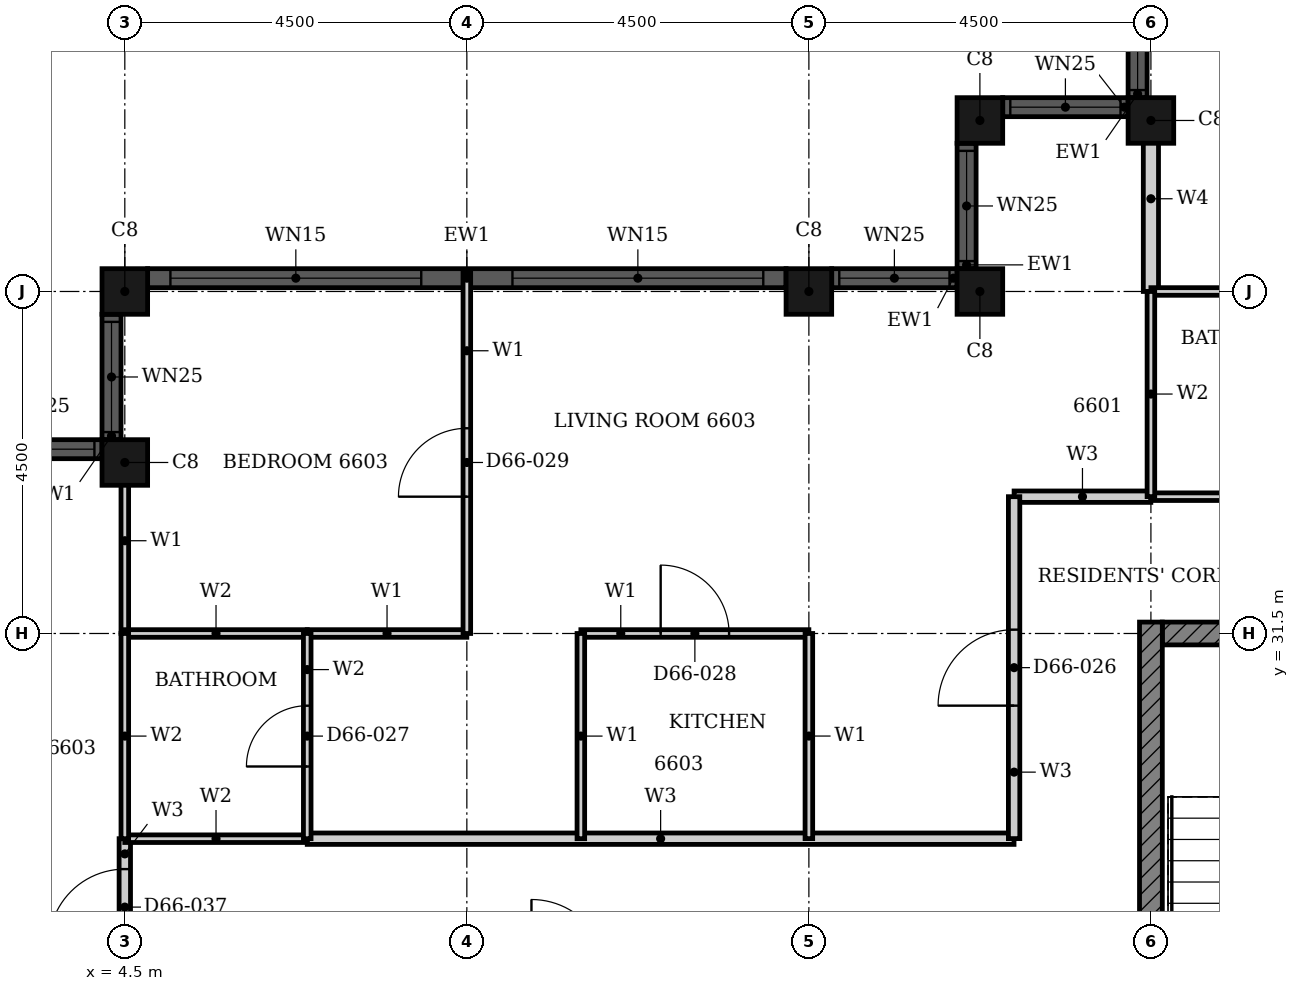
"""IFC4 building model, lengths in metres.
Left out: names, types, materials, properties, quantities, classifications, styles, units other than length and angle.
Written with IfcOpenShell. Run it as: python <this file> out.ifc"""

import sys

from ifc_helpers import new_model, si_unit, direction, frame, frame_2d, origin, origin_2d, place, context, subcontext, project, spatial, rectangle, hollow_rectangle, extrude, element, fill, save


model = new_model("IFC4")
c1 = context("Model", 3, precision=1e-05, world=origin(), true_north=direction((0.0, 1.0)))
c2 = subcontext(c1, "Body", "Model", "MODEL_VIEW")
j1 = project(units=[si_unit("LENGTHUNIT", "METRE"), si_unit("PLANEANGLEUNIT", "RADIAN")], contexts=[c1])
p1 = place(None, origin())
s1 = spatial("IfcSite", under=j1, at=p1, CompositionType="ELEMENT")
p2 = place(p1, origin())
s2 = spatial("IfcBuilding", under=s1, at=p2, CompositionType="ELEMENT")
p3 = place(p2, frame((0.0, 0.0, 260.1)))
s3 = spatial("IfcBuildingStorey", under=s2, at=p3, CompositionType="ELEMENT", Elevation=260.1)
for number, where, z_axis, x_axis in (
    (1, (18.0, 38.25, 0.0), (0.0, 0.0, 1.0), (1.0, 0.0, 0.0)),
    (2, (15.75, 38.25, 0.0), (0.0, 0.0, 1.0), (1.0, 0.0, 0.0)),
    (3, (15.75, 36.0, 0.0), (0.0, 0.0, 1.0), (1.0, 0.0, 0.0)),
    (4, (13.5, 36.0, 0.0), (0.0, 0.0, 1.0), (1.0, 0.0, 0.0)),
    (5, (4.5, 36.0, 0.0), (0.0, 0.0, 1.0), (1.0, 0.0, 0.0)),
    (6, (4.5, 33.75, 0.0), (0.0, 0.0, 1.0), (1.0, 0.0, 0.0)),
):
    element("IfcColumn", number, at=place(p3, frame(where, z_axis=z_axis, x_axis=x_axis)), inside=s3, PredefinedType="COLUMN", context=c2, shape_type="SweptSolid", body=[
        extrude(hollow_rectangle(XDim=0.6, YDim=0.6, WallThickness=0.02, at=origin_2d()), origin(), (0.0, 0.0, 1.0), 3.7),
    ])
p4 = place(p3, frame((17.825, 40.2, 0.0), z_axis=(0.0, 0.0, 1.0), x_axis=(0.0, -1.0, 0.0)))
e7 = element("IfcWall", 7, at=p4, inside=s3, PredefinedType="SOLIDWALL", context=c2, shape_type="SweptSolid", body=[
    extrude(rectangle(XDim=1.65, YDim=0.25, at=frame_2d((0.825, 0.0))), origin(), (0.0, 0.0, 1.0), 3.7),
])
p5 = place(p4, frame((0.1, 0.0, 0.9)))
e8 = element("IfcOpeningElement", 8, at=p5, cuts=e7, PredefinedType="OPENING", context=c2, shape_type="SweptSolid", body=[
    extrude(rectangle(XDim=1.45, YDim=1.85, at=frame_2d((0.725, 0.925))), frame((0.0, 0.135, 0.0), z_axis=(0.0, -1.0, 0.0), x_axis=(1.0, 0.0, 0.0)), (0.0, 0.0, 1.0), 0.27),
])
p6 = place(p3, frame((17.7, 38.425, 0.0), z_axis=(0.0, 0.0, 1.0), x_axis=(-1.0, 0.0, 0.0)))
e9 = element("IfcWall", 9, at=p6, inside=s3, PredefinedType="SOLIDWALL", context=c2, shape_type="SweptSolid", body=[
    extrude(rectangle(XDim=1.65, YDim=0.25, at=frame_2d((0.825, 0.0))), origin(), (0.0, 0.0, 1.0), 3.7),
])
p7 = place(p6, frame((0.1, 0.0, 0.9)))
e10 = element("IfcOpeningElement", 10, at=p7, cuts=e9, PredefinedType="OPENING", context=c2, shape_type="SweptSolid", body=[
    extrude(rectangle(XDim=1.45, YDim=1.85, at=frame_2d((0.725, 0.925))), frame((0.0, 0.135, 0.0), z_axis=(0.0, -1.0, 0.0), x_axis=(1.0, 0.0, 0.0)), (0.0, 0.0, 1.0), 0.27),
])
p8 = place(p3, frame((15.575, 37.95, 0.0), z_axis=(0.0, 0.0, 1.0), x_axis=(0.0, -1.0, 0.0)))
e11 = element("IfcWall", 11, at=p8, inside=s3, PredefinedType="SOLIDWALL", context=c2, shape_type="SweptSolid", body=[
    extrude(rectangle(XDim=1.65, YDim=0.25, at=frame_2d((0.825, 0.0))), origin(), (0.0, 0.0, 1.0), 3.7),
])
p9 = place(p8, frame((0.1, 0.0, 0.9)))
e12 = element("IfcOpeningElement", 12, at=p9, cuts=e11, PredefinedType="OPENING", context=c2, shape_type="SweptSolid", body=[
    extrude(rectangle(XDim=1.45, YDim=1.85, at=frame_2d((0.725, 0.925))), frame((0.0, 0.135, 0.0), z_axis=(0.0, -1.0, 0.0), x_axis=(1.0, 0.0, 0.0)), (0.0, 0.0, 1.0), 0.27),
])
p10 = place(p3, frame((15.45, 36.175, 0.0), z_axis=(0.0, 0.0, 1.0), x_axis=(-1.0, 0.0, 0.0)))
e13 = element("IfcWall", 13, at=p10, inside=s3, PredefinedType="SOLIDWALL", context=c2, shape_type="SweptSolid", body=[
    extrude(rectangle(XDim=1.65, YDim=0.25, at=frame_2d((0.825, 0.0))), origin(), (0.0, 0.0, 1.0), 3.7),
])
p11 = place(p10, frame((0.1, 0.0, 0.9)))
e14 = element("IfcOpeningElement", 14, at=p11, cuts=e13, PredefinedType="OPENING", context=c2, shape_type="SweptSolid", body=[
    extrude(rectangle(XDim=1.45, YDim=1.85, at=frame_2d((0.725, 0.925))), frame((0.0, 0.135, 0.0), z_axis=(0.0, -1.0, 0.0), x_axis=(1.0, 0.0, 0.0)), (0.0, 0.0, 1.0), 0.27),
])
p12 = place(p3, frame((13.2, 36.175, 0.0), z_axis=(0.0, 0.0, 1.0), x_axis=(-1.0, 0.0, 0.0)))
e15 = element("IfcWall", 15, at=p12, inside=s3, PredefinedType="SOLIDWALL", context=c2, shape_type="SweptSolid", body=[
    extrude(rectangle(XDim=8.4, YDim=0.25, at=frame_2d((4.2, 0.0))), origin(), (0.0, 0.0, 1.0), 3.7),
])
p13 = place(p12, frame((0.3, 0.0, 0.45)))
e16 = element("IfcOpeningElement", 16, at=p13, cuts=e15, PredefinedType="OPENING", context=c2, shape_type="SweptSolid", body=[
    extrude(rectangle(XDim=3.3, YDim=2.3, at=frame_2d((1.65, 1.15))), frame((0.0, 0.135, 0.0), z_axis=(0.0, -1.0, 0.0), x_axis=(1.0, 0.0, 0.0)), (0.0, 0.0, 1.0), 0.27),
])
p14 = place(p12, frame((4.8, 0.0, 0.45)))
e17 = element("IfcOpeningElement", 17, at=p14, cuts=e15, PredefinedType="OPENING", context=c2, shape_type="SweptSolid", body=[
    extrude(rectangle(XDim=3.3, YDim=2.3, at=frame_2d((1.65, 1.15))), frame((0.0, 0.135, 0.0), z_axis=(0.0, -1.0, 0.0), x_axis=(1.0, 0.0, 0.0)), (0.0, 0.0, 1.0), 0.27),
])
p15 = place(p3, frame((4.325, 35.7, 0.0), z_axis=(0.0, 0.0, 1.0), x_axis=(0.0, -1.0, 0.0)))
e18 = element("IfcWall", 18, at=p15, inside=s3, PredefinedType="SOLIDWALL", context=c2, shape_type="SweptSolid", body=[
    extrude(rectangle(XDim=1.65, YDim=0.25, at=frame_2d((0.825, 0.0))), origin(), (0.0, 0.0, 1.0), 3.7),
])
p16 = place(p15, frame((0.1, 0.0, 0.9)))
e19 = element("IfcOpeningElement", 19, at=p16, cuts=e18, PredefinedType="OPENING", context=c2, shape_type="SweptSolid", body=[
    extrude(rectangle(XDim=1.45, YDim=1.85, at=frame_2d((0.725, 0.925))), frame((0.0, 0.135, 0.0), z_axis=(0.0, -1.0, 0.0), x_axis=(1.0, 0.0, 0.0)), (0.0, 0.0, 1.0), 0.27),
])
p17 = place(p3, frame((4.2, 33.925, 0.0), z_axis=(0.0, 0.0, 1.0), x_axis=(-1.0, 0.0, 0.0)))
e20 = element("IfcWall", 20, at=p17, inside=s3, PredefinedType="SOLIDWALL", context=c2, shape_type="SweptSolid", body=[
    extrude(rectangle(XDim=1.65, YDim=0.25, at=frame_2d((0.825, 0.0))), origin(), (0.0, 0.0, 1.0), 3.7),
])
p18 = place(p17, frame((0.1, 0.0, 0.9)))
e21 = element("IfcOpeningElement", 21, at=p18, cuts=e20, PredefinedType="OPENING", context=c2, shape_type="SweptSolid", body=[
    extrude(rectangle(XDim=1.45, YDim=1.85, at=frame_2d((0.725, 0.925))), frame((0.0, 0.135, 0.0), z_axis=(0.0, -1.0, 0.0), x_axis=(1.0, 0.0, 0.0)), (0.0, 0.0, 1.0), 0.27),
])
p19 = place(p3, frame((18.15, 31.5, 0.0), z_axis=(0.0, 0.0, 1.0), x_axis=(1.0, 0.0, 0.0)))
e22 = element("IfcWall", 22, at=p19, inside=s3, PredefinedType="SHEAR", context=c2, shape_type="SweptSolid", body=[
    extrude(rectangle(XDim=9.368, YDim=0.3, at=frame_2d((4.684, 0.0))), origin(), (0.0, 0.0, 1.0), 3.4),
])
p20 = place(p19, frame((4.736, 0.0, 0.0)))
e23 = element("IfcOpeningElement", 23, at=p20, cuts=e22, PredefinedType="OPENING", context=c2, shape_type="SweptSolid", body=[
    extrude(rectangle(XDim=1.8, YDim=2.1, at=frame_2d((0.9, 1.05))), frame((0.0, 0.16, 0.0), z_axis=(0.0, -1.0, 0.0), x_axis=(1.0, 0.0, 0.0)), (0.0, 0.0, 1.0), 0.32),
])
p21 = place(p3, frame((18.0, 22.35, 0.0), z_axis=(0.0, 0.0, 1.0), x_axis=(0.0, 1.0, 0.0)))
e24 = element("IfcWall", 24, at=p21, inside=s3, PredefinedType="SHEAR", context=c2, shape_type="SweptSolid", body=[
    extrude(rectangle(XDim=9.3, YDim=0.3, at=frame_2d((4.65, 0.0))), origin(), (0.0, 0.0, 1.0), 3.4),
])
p22 = place(p3, frame((6.9, 28.8, 0.0), z_axis=(0.0, 0.0, 1.0), x_axis=(1.0, 0.0, 0.0)))
e25 = element("IfcWall", 25, at=p22, inside=s3, PredefinedType="PARTITIONING", context=c2, shape_type="SweptSolid", body=[
    extrude(rectangle(XDim=9.299, YDim=0.15, at=frame_2d((4.649, 0.0))), origin(), (0.0, 0.0, 1.0), 3.4),
])
p23 = place(p3, frame((16.2, 33.3, 0.0), z_axis=(0.0, 0.0, 1.0), x_axis=(1.0, 0.0, 0.0)))
e26 = element("IfcWall", 26, at=p23, inside=s3, PredefinedType="PARTITIONING", context=c2, shape_type="SweptSolid", body=[
    extrude(rectangle(XDim=1.799, YDim=0.15, at=frame_2d((0.899, 0.0))), origin(), (0.0, 0.0, 1.0), 3.4),
])
p24 = place(p3, frame((16.2, 28.801, 0.0), z_axis=(0.0, 0.0, 1.0), x_axis=(0.0, 1.0, 0.0)))
e27 = element("IfcWall", 27, at=p24, inside=s3, PredefinedType="PARTITIONING", context=c2, shape_type="SweptSolid", body=[
    extrude(rectangle(XDim=4.499, YDim=0.15, at=frame_2d((2.25, 0.0))), origin(), (0.0, 0.0, 1.0), 3.4),
])
p25 = place(p24, frame((1.75, 0.0, 0.0)))
e28 = element("IfcOpeningElement", 28, at=p25, cuts=e27, PredefinedType="OPENING", context=c2, shape_type="SweptSolid", body=[
    extrude(rectangle(XDim=1.0, YDim=2.2, at=frame_2d((0.5, 1.1))), frame((0.0, 0.085, 0.0), z_axis=(0.0, -1.0, 0.0), x_axis=(1.0, 0.0, 0.0)), (0.0, 0.0, 1.0), 0.17),
])
p26 = place(p3, frame((4.5, 27.0, 0.0), z_axis=(0.0, 0.0, 1.0), x_axis=(0.0, 1.0, 0.0)))
e29 = element("IfcWall", 29, at=p26, inside=s3, PredefinedType="PARTITIONING", context=c2, shape_type="SweptSolid", body=[
    extrude(rectangle(XDim=1.8, YDim=0.15, at=frame_2d((0.9, 0.0))), origin(), (0.0, 0.0, 1.0), 3.4),
])
p27 = place(p26, frame((0.4, 0.0, 0.0)))
e30 = element("IfcOpeningElement", 30, at=p27, cuts=e29, PredefinedType="OPENING", context=c2, shape_type="SweptSolid", body=[
    extrude(rectangle(XDim=1.0, YDim=2.1, at=frame_2d((0.5, 1.05))), frame((0.0, 0.085, 0.0), z_axis=(0.0, -1.0, 0.0), x_axis=(1.0, 0.0, 0.0)), (0.0, 0.0, 1.0), 0.17),
])
p28 = place(p3, frame((6.9, 31.5, 0.0), z_axis=(0.0, 0.0, 1.0), x_axis=(1.0, 0.0, 0.0)))
e31 = element("IfcWall", 31, at=p28, inside=s3, PredefinedType="PARTITIONING", context=c2, shape_type="SweptSolid", body=[
    extrude(rectangle(XDim=2.1, YDim=0.1, at=frame_2d((1.05, 0.0))), origin(), (0.0, 0.0, 1.0), 2.68),
])
p29 = place(p3, frame((10.5, 31.5, 0.0), z_axis=(0.0, 0.0, 1.0), x_axis=(1.0, 0.0, 0.0)))
e32 = element("IfcWall", 32, at=p29, inside=s3, PredefinedType="PARTITIONING", context=c2, shape_type="SweptSolid", body=[
    extrude(rectangle(XDim=3.0, YDim=0.1, at=frame_2d((1.5, 0.0))), origin(), (0.0, 0.0, 1.0), 2.68),
])
p30 = place(p29, frame((1.05, 0.0, 0.0)))
e33 = element("IfcOpeningElement", 33, at=p30, cuts=e32, PredefinedType="OPENING", context=c2, shape_type="SweptSolid", body=[
    extrude(rectangle(XDim=0.9, YDim=2.1, at=frame_2d((0.45, 1.05))), frame((0.0, 0.06, 0.0), z_axis=(0.0, -1.0, 0.0), x_axis=(1.0, 0.0, 0.0)), (0.0, 0.0, 1.0), 0.12),
])
p31 = place(p3, frame((10.5, 28.8, 0.0), z_axis=(0.0, 0.0, 1.0), x_axis=(0.0, 1.0, 0.0)))
e34 = element("IfcWall", 34, at=p31, inside=s3, PredefinedType="PARTITIONING", context=c2, shape_type="SweptSolid", body=[
    extrude(rectangle(XDim=2.7, YDim=0.1, at=frame_2d((1.35, 0.0))), origin(), (0.0, 0.0, 1.0), 3.4),
])
p32 = place(p3, frame((13.5, 28.801, 0.0), z_axis=(0.0, 0.0, 1.0), x_axis=(0.0, 1.0, 0.0)))
e35 = element("IfcWall", 35, at=p32, inside=s3, PredefinedType="PARTITIONING", context=c2, shape_type="SweptSolid", body=[
    extrude(rectangle(XDim=2.699, YDim=0.1, at=frame_2d((1.35, 0.0))), origin(), (0.0, 0.0, 1.0), 2.48),
])
p33 = place(p3, frame((4.5, 31.501, 0.0), z_axis=(0.0, 0.0, 1.0), x_axis=(0.0, 1.0, 0.0)))
e36 = element("IfcWall", 36, at=p33, inside=s3, PredefinedType="PARTITIONING", context=c2, shape_type="SweptSolid", body=[
    extrude(rectangle(XDim=2.439, YDim=0.1, at=frame_2d((1.219, 0.0))), origin(), (0.0, 0.0, 1.0), 3.4),
])
p34 = place(p3, frame((9.0, 31.5, 0.0), z_axis=(0.0, 0.0, 1.0), x_axis=(0.0, 1.0, 0.0)))
e37 = element("IfcWall", 37, at=p34, inside=s3, PredefinedType="PARTITIONING", context=c2, shape_type="SweptSolid", body=[
    extrude(rectangle(XDim=4.74, YDim=0.1, at=frame_2d((2.37, 0.0))), origin(), (0.0, 0.0, 1.0), 3.4),
])
p35 = place(p34, frame((1.8, 0.0, 0.0)))
e38 = element("IfcOpeningElement", 38, at=p35, cuts=e37, PredefinedType="OPENING", context=c2, shape_type="SweptSolid", body=[
    extrude(rectangle(XDim=0.9, YDim=2.1, at=frame_2d((0.45, 1.05))), frame((0.0, 0.06, 0.0), z_axis=(0.0, -1.0, 0.0), x_axis=(1.0, 0.0, 0.0)), (0.0, 0.0, 1.0), 0.12),
])
p36 = place(p3, frame((18.0, 36.0, 0.0), z_axis=(0.0, 0.0, 1.0), x_axis=(0.0, 1.0, 0.0)))
e39 = element("IfcWall", 39, at=p36, inside=s3, PredefinedType="PARTITIONING", context=c2, shape_type="SweptSolid", body=[
    extrude(rectangle(XDim=2.44, YDim=0.2, at=frame_2d((1.22, 0.0))), origin(), (0.0, 0.0, 1.0), 3.4),
])
p37 = place(p3, frame((4.5, 28.8, 0.0), z_axis=(0.0, 0.0, 1.0), x_axis=(1.0, 0.0, 0.0)))
e40 = element("IfcWall", 40, at=p37, inside=s3, PredefinedType="PARTITIONING", context=c2, shape_type="SweptSolid", body=[
    extrude(rectangle(XDim=2.4, YDim=0.1, at=frame_2d((1.2, 0.0))), origin(), (0.0, 0.0, 1.0), 3.4),
])
p38 = place(p3, frame((4.5, 31.5, 0.0), z_axis=(0.0, 0.0, 1.0), x_axis=(1.0, 0.0, 0.0)))
e41 = element("IfcWall", 41, at=p38, inside=s3, PredefinedType="PARTITIONING", context=c2, shape_type="SweptSolid", body=[
    extrude(rectangle(XDim=2.4, YDim=0.1, at=frame_2d((1.2, 0.0))), origin(), (0.0, 0.0, 1.0), 2.68),
])
for number, where, z_axis, x_axis in (
    (42, (18.0, 33.3, 0.0), (0.0, 0.0, 1.0), (1.0, 0.0, 0.0)),
    (43, (18.0, 36.0, 0.0), (0.0, 0.0, 1.0), (1.0, 0.0, 0.0)),
):
    element("IfcWall", number, at=place(p3, frame(where, z_axis=z_axis, x_axis=x_axis)), inside=s3, PredefinedType="PARTITIONING", context=c2, shape_type="SweptSolid", body=[
        extrude(rectangle(XDim=2.4, YDim=0.1, at=frame_2d((1.2, 0.0))), origin(), (0.0, 0.0, 1.0), 3.4),
    ])
p39 = place(p3, frame((18.0, 33.301, 0.0), z_axis=(0.0, 0.0, 1.0), x_axis=(0.0, 1.0, 0.0)))
e44 = element("IfcWall", 44, at=p39, inside=s3, PredefinedType="PARTITIONING", context=c2, shape_type="SweptSolid", body=[
    extrude(rectangle(XDim=2.699, YDim=0.1, at=frame_2d((1.35, 0.0))), origin(), (0.0, 0.0, 1.0), 3.4),
])
p40 = place(p3, frame((4.5, 28.8, 0.0), z_axis=(0.0, 0.0, 1.0), x_axis=(0.0, 1.0, 0.0)))
e45 = element("IfcWall", 45, at=p40, inside=s3, PredefinedType="PARTITIONING", context=c2, shape_type="SweptSolid", body=[
    extrude(rectangle(XDim=2.7, YDim=0.1, at=frame_2d((1.35, 0.0))), origin(), (0.0, 0.0, 1.0), 3.4),
])
p41 = place(p3, frame((6.9, 28.8, 0.0), z_axis=(0.0, 0.0, 1.0), x_axis=(0.0, 1.0, 0.0)))
e46 = element("IfcWall", 46, at=p41, inside=s3, PredefinedType="PARTITIONING", context=c2, shape_type="SweptSolid", body=[
    extrude(rectangle(XDim=2.7, YDim=0.1, at=frame_2d((1.35, 0.0))), origin(), (0.0, 0.0, 1.0), 3.4),
])
p42 = place(p41, frame((0.95, 0.0, 0.0)))
e47 = element("IfcOpeningElement", 47, at=p42, cuts=e46, PredefinedType="OPENING", context=c2, shape_type="SweptSolid", body=[
    extrude(rectangle(XDim=0.8, YDim=2.1, at=frame_2d((0.4, 1.05))), frame((0.0, 0.06, 0.0), z_axis=(0.0, -1.0, 0.0), x_axis=(1.0, 0.0, 0.0)), (0.0, 0.0, 1.0), 0.12),
])
p43 = place(p5, origin())
e48 = element("IfcWindow", 48, at=p43, inside=s3, PartitioningType="SINGLE_PANEL", PredefinedType="WINDOW", context=c2, shape_type="SweptSolid", body=[
    extrude(rectangle(XDim=1.45, YDim=1.85, at=frame_2d((0.725, 0.925))), frame((0.0, 0.03, 0.0), z_axis=(0.0, -1.0, 0.0), x_axis=(1.0, 0.0, 0.0)), (0.0, 0.0, 1.0), 0.06),
])
fill(e8, e48)
p44 = place(p7, origin())
e49 = element("IfcWindow", 49, at=p44, inside=s3, PartitioningType="SINGLE_PANEL", PredefinedType="WINDOW", context=c2, shape_type="SweptSolid", body=[
    extrude(rectangle(XDim=1.45, YDim=1.85, at=frame_2d((0.725, 0.925))), frame((0.0, 0.03, 0.0), z_axis=(0.0, -1.0, 0.0), x_axis=(1.0, 0.0, 0.0)), (0.0, 0.0, 1.0), 0.06),
])
fill(e10, e49)
p45 = place(p9, origin())
e50 = element("IfcWindow", 50, at=p45, inside=s3, PartitioningType="SINGLE_PANEL", PredefinedType="WINDOW", context=c2, shape_type="SweptSolid", body=[
    extrude(rectangle(XDim=1.45, YDim=1.85, at=frame_2d((0.725, 0.925))), frame((0.0, 0.03, 0.0), z_axis=(0.0, -1.0, 0.0), x_axis=(1.0, 0.0, 0.0)), (0.0, 0.0, 1.0), 0.06),
])
fill(e12, e50)
p46 = place(p11, origin())
e51 = element("IfcWindow", 51, at=p46, inside=s3, PartitioningType="SINGLE_PANEL", PredefinedType="WINDOW", context=c2, shape_type="SweptSolid", body=[
    extrude(rectangle(XDim=1.45, YDim=1.85, at=frame_2d((0.725, 0.925))), frame((0.0, 0.03, 0.0), z_axis=(0.0, -1.0, 0.0), x_axis=(1.0, 0.0, 0.0)), (0.0, 0.0, 1.0), 0.06),
])
fill(e14, e51)
p47 = place(p13, origin())
e52 = element("IfcWindow", 52, at=p47, inside=s3, PartitioningType="SINGLE_PANEL", PredefinedType="WINDOW", context=c2, shape_type="SweptSolid", body=[
    extrude(rectangle(XDim=3.3, YDim=2.3, at=frame_2d((1.65, 1.15))), frame((0.0, 0.03, 0.0), z_axis=(0.0, -1.0, 0.0), x_axis=(1.0, 0.0, 0.0)), (0.0, 0.0, 1.0), 0.06),
])
fill(e16, e52)
p48 = place(p14, origin())
e53 = element("IfcWindow", 53, at=p48, inside=s3, PartitioningType="SINGLE_PANEL", PredefinedType="WINDOW", context=c2, shape_type="SweptSolid", body=[
    extrude(rectangle(XDim=3.3, YDim=2.3, at=frame_2d((1.65, 1.15))), frame((0.0, 0.03, 0.0), z_axis=(0.0, -1.0, 0.0), x_axis=(1.0, 0.0, 0.0)), (0.0, 0.0, 1.0), 0.06),
])
fill(e17, e53)
p49 = place(p16, origin())
e54 = element("IfcWindow", 54, at=p49, inside=s3, PartitioningType="SINGLE_PANEL", PredefinedType="WINDOW", context=c2, shape_type="SweptSolid", body=[
    extrude(rectangle(XDim=1.45, YDim=1.85, at=frame_2d((0.725, 0.925))), frame((0.0, 0.03, 0.0), z_axis=(0.0, -1.0, 0.0), x_axis=(1.0, 0.0, 0.0)), (0.0, 0.0, 1.0), 0.06),
])
fill(e19, e54)
p50 = place(p18, origin())
e55 = element("IfcWindow", 55, at=p50, inside=s3, PartitioningType="SINGLE_PANEL", PredefinedType="WINDOW", context=c2, shape_type="SweptSolid", body=[
    extrude(rectangle(XDim=1.45, YDim=1.85, at=frame_2d((0.725, 0.925))), frame((0.0, 0.03, 0.0), z_axis=(0.0, -1.0, 0.0), x_axis=(1.0, 0.0, 0.0)), (0.0, 0.0, 1.0), 0.06),
])
fill(e21, e55)
p51 = place(p25, origin())
e56 = element("IfcDoor", 56, at=p51, inside=s3, OperationType="SINGLE_SWING_LEFT", PredefinedType="DOOR", context=c2, shape_type="SweptSolid", body=[
    extrude(rectangle(XDim=1.0, YDim=2.2, at=frame_2d((0.5, 1.1))), frame((0.0, 0.025, 0.0), z_axis=(0.0, -1.0, 0.0), x_axis=(1.0, 0.0, 0.0)), (0.0, 0.0, 1.0), 0.05),
])
fill(e28, e56)
p52 = place(p42, origin())
e57 = element("IfcDoor", 57, at=p52, inside=s3, OperationType="SINGLE_SWING_LEFT", PredefinedType="DOOR", context=c2, shape_type="SweptSolid", body=[
    extrude(rectangle(XDim=0.8, YDim=2.1, at=frame_2d((0.4, 1.05))), frame((0.0, 0.025, 0.0), z_axis=(0.0, -1.0, 0.0), x_axis=(1.0, 0.0, 0.0)), (0.0, 0.0, 1.0), 0.05),
])
fill(e47, e57)
p53 = place(p30, origin())
e58 = element("IfcDoor", 58, at=p53, inside=s3, OperationType="SINGLE_SWING_RIGHT", PredefinedType="DOOR", context=c2, shape_type="SweptSolid", body=[
    extrude(rectangle(XDim=0.9, YDim=2.1, at=frame_2d((0.45, 1.05))), frame((0.0, 0.025, 0.0), z_axis=(0.0, -1.0, 0.0), x_axis=(1.0, 0.0, 0.0)), (0.0, 0.0, 1.0), 0.05),
])
fill(e33, e58)
p54 = place(p35, origin())
e59 = element("IfcDoor", 59, at=p54, inside=s3, OperationType="SINGLE_SWING_RIGHT", PredefinedType="DOOR", context=c2, shape_type="SweptSolid", body=[
    extrude(rectangle(XDim=0.9, YDim=2.1, at=frame_2d((0.45, 1.05))), frame((0.0, 0.025, 0.0), z_axis=(0.0, -1.0, 0.0), x_axis=(1.0, 0.0, 0.0)), (0.0, 0.0, 1.0), 0.05),
])
fill(e38, e59)
p55 = place(p27, origin())
e60 = element("IfcDoor", 60, at=p55, inside=s3, OperationType="SINGLE_SWING_RIGHT", PredefinedType="DOOR", context=c2, shape_type="SweptSolid", body=[
    extrude(rectangle(XDim=1.0, YDim=2.1, at=frame_2d((0.5, 1.05))), frame((0.0, 0.025, 0.0), z_axis=(0.0, -1.0, 0.0), x_axis=(1.0, 0.0, 0.0)), (0.0, 0.0, 1.0), 0.05),
])
fill(e30, e60)
save(model, sys.argv[1])
